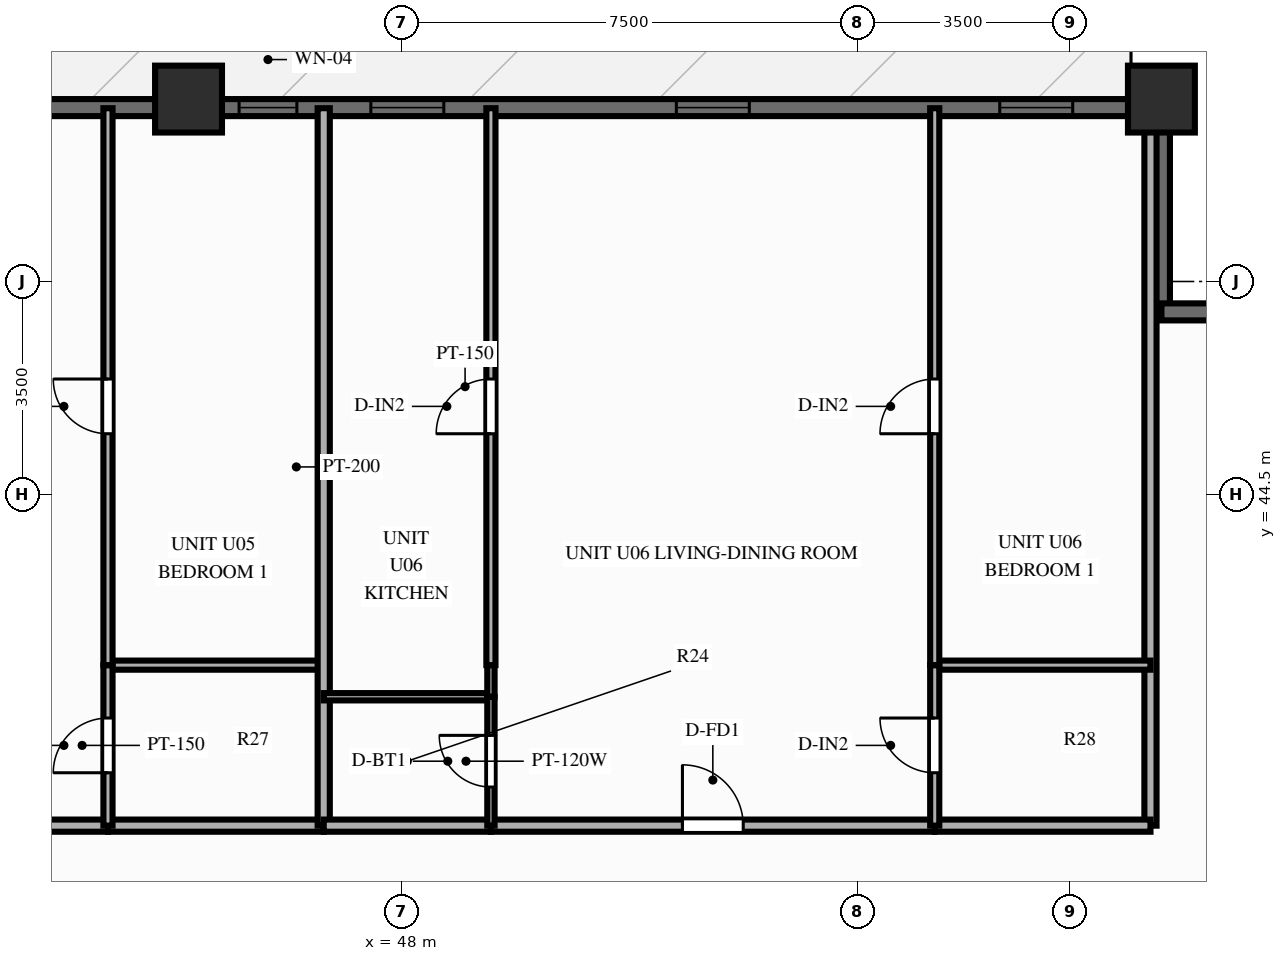
"""IFC4 building model, lengths in metres.
Left out: names, types, materials, properties, quantities, classifications, styles, units other than length and angle.
Written with IfcOpenShell. Run it as: python <this file> out.ifc"""

import sys

from ifc_helpers import new_model, si_unit, direction, frame, frame_2d, origin, origin_2d, place, context, subcontext, project, spatial, rectangle, extrude, source, transform, mapped, element, fill, save


model = new_model("IFC4")
c1 = context("Model", 3, precision=1e-05, world=origin(), true_north=direction((0.0, 1.0)))
c2 = subcontext(c1, "Body", "Model", "MODEL_VIEW")
j1 = project(units=[si_unit("LENGTHUNIT", "METRE"), si_unit("PLANEANGLEUNIT", "RADIAN")], contexts=[c1])
p1 = place(None, origin())
s1 = spatial("IfcSite", under=j1, at=p1, CompositionType="ELEMENT")
p2 = place(p1, origin())
s2 = spatial("IfcBuilding", under=s1, at=p2, CompositionType="ELEMENT")
p3 = place(p2, frame((0.0, 0.0, 46.4)))
s3 = spatial("IfcBuildingStorey", under=s2, at=p3, CompositionType="ELEMENT", Elevation=46.4)
m1 = source(origin(), c2, "Body", "SweptSolid", [
    extrude(rectangle(XDim=1.1, YDim=1.1, at=origin_2d()), origin(), (0.0, 0.0, 1.0), 3.0),
])
for number, where, z_axis, x_axis in (
    (1, (60.5, 51.0, 0.0), (0.0, 0.0, 1.0), (1.0, 0.0, 0.0)),
    (2, (44.5, 51.0, 0.0), (0.0, 0.0, 1.0), (1.0, 0.0, 0.0)),
):
    element("IfcColumn", number, at=place(p3, frame(where, z_axis=z_axis, x_axis=x_axis)), inside=s3, PredefinedType="COLUMN", context=c2, shape_type="MappedRepresentation", body=[
        mapped(m1, transform((0.0, 0.0, 0.0), scale=1.0)),
    ])
p4 = place(p3, frame((15.5, 50.86, 0.0), z_axis=(0.0, 0.0, 1.0), x_axis=(1.0, 0.0, 0.0)))
e3 = element("IfcWall", 3, at=p4, inside=s3, PredefinedType="SOLIDWALL", context=c2, shape_type="SweptSolid", body=[
    extrude(rectangle(XDim=45.0, YDim=0.28, at=frame_2d((22.5, 0.0))), origin(), (0.0, 0.0, 1.0), 2.28),
])
p5 = place(p4, frame((0.76, 0.0, 0.25)))
e4 = element("IfcOpeningElement", 4, at=p5, cuts=e3, PredefinedType="OPENING", context=c2, shape_type="SweptSolid", body=[
    extrude(rectangle(XDim=1.2, YDim=1.5, at=frame_2d((0.6, 0.75))), frame((0.0, 0.152, 0.0), z_axis=(0.0, -1.0, 0.0), x_axis=(1.0, 0.0, 0.0)), (0.0, 0.0, 1.0), 0.304),
])
p6 = place(p4, frame((2.83, 0.0, 0.25)))
e5 = element("IfcOpeningElement", 5, at=p6, cuts=e3, PredefinedType="OPENING", context=c2, shape_type="SweptSolid", body=[
    extrude(rectangle(XDim=1.2, YDim=1.5, at=frame_2d((0.6, 0.75))), frame((0.0, 0.152, 0.0), z_axis=(0.0, -1.0, 0.0), x_axis=(1.0, 0.0, 0.0)), (0.0, 0.0, 1.0), 0.304),
])
p7 = place(p4, frame((5.135, 0.0, 0.25)))
e6 = element("IfcOpeningElement", 6, at=p7, cuts=e3, PredefinedType="OPENING", context=c2, shape_type="SweptSolid", body=[
    extrude(rectangle(XDim=1.2, YDim=1.5, at=frame_2d((0.6, 0.75))), frame((0.0, 0.152, 0.0), z_axis=(0.0, -1.0, 0.0), x_axis=(1.0, 0.0, 0.0)), (0.0, 0.0, 1.0), 0.304),
])
p8 = place(p4, frame((7.753, 0.0, 0.25)))
e7 = element("IfcOpeningElement", 7, at=p8, cuts=e3, PredefinedType="OPENING", context=c2, shape_type="SweptSolid", body=[
    extrude(rectangle(XDim=1.2, YDim=1.5, at=frame_2d((0.6, 0.75))), frame((0.0, 0.152, 0.0), z_axis=(0.0, -1.0, 0.0), x_axis=(1.0, 0.0, 0.0)), (0.0, 0.0, 1.0), 0.304),
])
p9 = place(p4, frame((10.266, 0.0, 0.25)))
e8 = element("IfcOpeningElement", 8, at=p9, cuts=e3, PredefinedType="OPENING", context=c2, shape_type="SweptSolid", body=[
    extrude(rectangle(XDim=1.2, YDim=1.5, at=frame_2d((0.6, 0.75))), frame((0.0, 0.152, 0.0), z_axis=(0.0, -1.0, 0.0), x_axis=(1.0, 0.0, 0.0)), (0.0, 0.0, 1.0), 0.304),
])
p10 = place(p4, frame((12.571, 0.0, 0.25)))
e9 = element("IfcOpeningElement", 9, at=p10, cuts=e3, PredefinedType="OPENING", context=c2, shape_type="SweptSolid", body=[
    extrude(rectangle(XDim=1.2, YDim=1.5, at=frame_2d((0.6, 0.75))), frame((0.0, 0.152, 0.0), z_axis=(0.0, -1.0, 0.0), x_axis=(1.0, 0.0, 0.0)), (0.0, 0.0, 1.0), 0.304),
])
p11 = place(p4, frame((14.643, 0.0, 0.25)))
e10 = element("IfcOpeningElement", 10, at=p11, cuts=e3, PredefinedType="OPENING", context=c2, shape_type="SweptSolid", body=[
    extrude(rectangle(XDim=0.7, YDim=1.5, at=frame_2d((0.35, 0.75))), frame((0.0, 0.152, 0.0), z_axis=(0.0, -1.0, 0.0), x_axis=(1.0, 0.0, 0.0)), (0.0, 0.0, 1.0), 0.304),
])
p12 = place(p4, frame((17.977, 0.0, 0.25)))
e11 = element("IfcOpeningElement", 11, at=p12, cuts=e3, PredefinedType="OPENING", context=c2, shape_type="SweptSolid", body=[
    extrude(rectangle(XDim=1.2, YDim=1.5, at=frame_2d((0.6, 0.75))), frame((0.0, 0.152, 0.0), z_axis=(0.0, -1.0, 0.0), x_axis=(1.0, 0.0, 0.0)), (0.0, 0.0, 1.0), 0.304),
])
p13 = place(p4, frame((23.263, 0.0, 0.0)))
e12 = element("IfcOpeningElement", 12, at=p13, cuts=e3, PredefinedType="OPENING", context=c2, shape_type="SweptSolid", body=[
    extrude(rectangle(XDim=1.1, YDim=2.15, at=frame_2d((0.55, 1.075))), frame((0.0, 0.152, 0.0), z_axis=(0.0, -1.0, 0.0), x_axis=(1.0, 0.0, 0.0)), (0.0, 0.0, 1.0), 0.304),
])
p14 = place(p4, frame((29.832, 0.0, 0.25)))
e13 = element("IfcOpeningElement", 13, at=p14, cuts=e3, PredefinedType="OPENING", context=c2, shape_type="SweptSolid", body=[
    extrude(rectangle(XDim=0.95, YDim=1.5, at=frame_2d((0.475, 0.75))), frame((0.0, 0.152, 0.0), z_axis=(0.0, -1.0, 0.0), x_axis=(1.0, 0.0, 0.0)), (0.0, 0.0, 1.0), 0.304),
])
p15 = place(p4, frame((31.998, 0.0, 0.25)))
e14 = element("IfcOpeningElement", 14, at=p15, cuts=e3, PredefinedType="OPENING", context=c2, shape_type="SweptSolid", body=[
    extrude(rectangle(XDim=1.2, YDim=1.5, at=frame_2d((0.6, 0.75))), frame((0.0, 0.152, 0.0), z_axis=(0.0, -1.0, 0.0), x_axis=(1.0, 0.0, 0.0)), (0.0, 0.0, 1.0), 0.304),
])
p16 = place(p4, frame((37.023, 0.0, 0.25)))
e15 = element("IfcOpeningElement", 15, at=p16, cuts=e3, PredefinedType="OPENING", context=c2, shape_type="SweptSolid", body=[
    extrude(rectangle(XDim=1.2, YDim=1.5, at=frame_2d((0.6, 0.75))), frame((0.0, 0.152, 0.0), z_axis=(0.0, -1.0, 0.0), x_axis=(1.0, 0.0, 0.0)), (0.0, 0.0, 1.0), 0.304),
])
p17 = place(p4, frame((42.341, 0.0, 0.25)))
e16 = element("IfcOpeningElement", 16, at=p17, cuts=e3, PredefinedType="OPENING", context=c2, shape_type="SweptSolid", body=[
    extrude(rectangle(XDim=1.2, YDim=1.5, at=frame_2d((0.6, 0.75))), frame((0.0, 0.152, 0.0), z_axis=(0.0, -1.0, 0.0), x_axis=(1.0, 0.0, 0.0)), (0.0, 0.0, 1.0), 0.304),
])
for number, where, z_axis, x_axis in (
    (17, (60.5, 47.5, 0.0), (0.0, 0.0, 1.0), (0.0, 1.0, 0.0)),
    (18, (60.5, 47.5, 0.0), (0.0, 0.0, 1.0), (1.0, 0.0, 0.0)),
):
    element("IfcWall", number, at=place(p3, frame(where, z_axis=z_axis, x_axis=x_axis)), inside=s3, PredefinedType="SOLIDWALL", context=c2, shape_type="SweptSolid", body=[
        extrude(rectangle(XDim=3.42, YDim=0.28, at=frame_2d((1.71, 0.0))), origin(), (0.0, 0.0, 1.0), 2.28),
    ])
p18 = place(p3, frame((60.32, 39.05, 0.0), z_axis=(0.0, 0.0, 1.0), x_axis=(0.0, 1.0, 0.0)))
e19 = element("IfcWall", 19, at=p18, inside=s3, PredefinedType="PARTITIONING", context=c2, shape_type="SweptSolid", body=[
    extrude(rectangle(XDim=11.8, YDim=0.2, at=frame_2d((5.9, 0.0))), origin(), (0.0, 0.0, 1.0), 2.79),
])
p19 = place(p3, frame((35.451, 39.05, 0.0), z_axis=(0.0, 0.0, 1.0), x_axis=(1.0, 0.0, 0.0)))
e20 = element("IfcWall", 20, at=p19, inside=s3, PredefinedType="PARTITIONING", context=c2, shape_type="SweptSolid", body=[
    extrude(rectangle(XDim=7.724, YDim=0.2, at=frame_2d((3.862, 0.0))), origin(), (0.0, 0.0, 1.0), 2.79),
])
p20 = place(p19, frame((3.362, 0.0, 0.0)))
e21 = element("IfcOpeningElement", 21, at=p20, cuts=e20, PredefinedType="OPENING", context=c2, shape_type="SweptSolid", body=[
    extrude(rectangle(XDim=1.0, YDim=2.15, at=frame_2d((0.5, 1.075))), frame((0.0, 0.112, 0.0), z_axis=(0.0, -1.0, 0.0), x_axis=(1.0, 0.0, 0.0)), (0.0, 0.0, 1.0), 0.224),
])
p21 = place(p3, frame((43.175, 39.05, 0.0), z_axis=(0.0, 0.0, 1.0), x_axis=(1.0, 0.0, 0.0)))
e22 = element("IfcWall", 22, at=p21, inside=s3, PredefinedType="PARTITIONING", context=c2, shape_type="SweptSolid", body=[
    extrude(rectangle(XDim=3.548, YDim=0.2, at=frame_2d((1.774, 0.0))), origin(), (0.0, 0.0, 1.0), 2.79),
])
p22 = place(p3, frame((43.175, 41.69, 0.0), z_axis=(0.0, 0.0, 1.0), x_axis=(1.0, 0.0, 0.0)))
e23 = element("IfcWall", 23, at=p22, inside=s3, PredefinedType="PARTITIONING", context=c2, shape_type="SweptSolid", body=[
    extrude(rectangle(XDim=3.548, YDim=0.15, at=frame_2d((1.774, 0.0))), origin(), (0.0, 0.0, 1.0), 2.79),
])
p23 = place(p3, frame((43.175, 39.05, 0.0), z_axis=(0.0, 0.0, 1.0), x_axis=(0.0, 1.0, 0.0)))
e24 = element("IfcWall", 24, at=p23, inside=s3, PredefinedType="PARTITIONING", context=c2, shape_type="SweptSolid", body=[
    extrude(rectangle(XDim=2.64, YDim=0.15, at=frame_2d((1.32, 0.0))), origin(), (0.0, 0.0, 1.0), 2.79),
])
p24 = place(p23, frame((0.87, 0.0, 0.0)))
e25 = element("IfcOpeningElement", 25, at=p24, cuts=e24, PredefinedType="OPENING", context=c2, shape_type="SweptSolid", body=[
    extrude(rectangle(XDim=0.9, YDim=2.1, at=frame_2d((0.45, 1.05))), frame((0.0, 0.087, 0.0), z_axis=(0.0, -1.0, 0.0), x_axis=(1.0, 0.0, 0.0)), (0.0, 0.0, 1.0), 0.174),
])
p25 = place(p3, frame((43.175, 41.69, 0.0), z_axis=(0.0, 0.0, 1.0), x_axis=(0.0, 1.0, 0.0)))
e26 = element("IfcWall", 26, at=p25, inside=s3, PredefinedType="PARTITIONING", context=c2, shape_type="SweptSolid", body=[
    extrude(rectangle(XDim=9.16, YDim=0.15, at=frame_2d((4.58, 0.0))), origin(), (0.0, 0.0, 1.0), 2.79),
])
p26 = place(p25, frame((3.806, 0.0, 0.0)))
e27 = element("IfcOpeningElement", 27, at=p26, cuts=e26, PredefinedType="OPENING", context=c2, shape_type="SweptSolid", body=[
    extrude(rectangle(XDim=0.9, YDim=2.1, at=frame_2d((0.45, 1.05))), frame((0.0, 0.087, 0.0), z_axis=(0.0, -1.0, 0.0), x_axis=(1.0, 0.0, 0.0)), (0.0, 0.0, 1.0), 0.174),
])
p27 = place(p3, frame((46.723, 39.05, 0.0), z_axis=(0.0, 0.0, 1.0), x_axis=(0.0, 1.0, 0.0)))
e28 = element("IfcWall", 28, at=p27, inside=s3, PredefinedType="PARTITIONING", context=c2, shape_type="SweptSolid", body=[
    extrude(rectangle(XDim=11.8, YDim=0.2, at=frame_2d((5.9, 0.0))), origin(), (0.0, 0.0, 1.0), 2.79),
])
p28 = place(p3, frame((46.723, 39.05, 0.0), z_axis=(0.0, 0.0, 1.0), x_axis=(1.0, 0.0, 0.0)))
e29 = element("IfcWall", 29, at=p28, inside=s3, PredefinedType="PARTITIONING", context=c2, shape_type="SweptSolid", body=[
    extrude(rectangle(XDim=2.75, YDim=0.2, at=frame_2d((1.375, 0.0))), origin(), (0.0, 0.0, 1.0), 2.79),
])
p29 = place(p3, frame((49.473, 39.05, 0.0), z_axis=(0.0, 0.0, 1.0), x_axis=(1.0, 0.0, 0.0)))
e30 = element("IfcWall", 30, at=p29, inside=s3, PredefinedType="PARTITIONING", context=c2, shape_type="SweptSolid", body=[
    extrude(rectangle(XDim=7.299, YDim=0.2, at=frame_2d((3.649, 0.0))), origin(), (0.0, 0.0, 1.0), 2.79),
])
p30 = place(p29, frame((3.149, 0.0, 0.0)))
e31 = element("IfcOpeningElement", 31, at=p30, cuts=e30, PredefinedType="OPENING", context=c2, shape_type="SweptSolid", body=[
    extrude(rectangle(XDim=1.0, YDim=2.15, at=frame_2d((0.5, 1.075))), frame((0.0, 0.112, 0.0), z_axis=(0.0, -1.0, 0.0), x_axis=(1.0, 0.0, 0.0)), (0.0, 0.0, 1.0), 0.224),
])
p31 = place(p3, frame((56.772, 39.05, 0.0), z_axis=(0.0, 0.0, 1.0), x_axis=(1.0, 0.0, 0.0)))
e32 = element("IfcWall", 32, at=p31, inside=s3, PredefinedType="PARTITIONING", context=c2, shape_type="SweptSolid", body=[
    extrude(rectangle(XDim=3.548, YDim=0.2, at=frame_2d((1.774, 0.0))), origin(), (0.0, 0.0, 1.0), 2.79),
])
p32 = place(p3, frame((46.723, 41.17, 0.0), z_axis=(0.0, 0.0, 1.0), x_axis=(1.0, 0.0, 0.0)))
e33 = element("IfcWall", 33, at=p32, inside=s3, PredefinedType="PARTITIONING", context=c2, shape_type="SweptSolid", body=[
    extrude(rectangle(XDim=2.75, YDim=0.12, at=frame_2d((1.375, 0.0))), origin(), (0.0, 0.0, 1.0), 2.79),
])
p33 = place(p3, frame((56.772, 41.69, 0.0), z_axis=(0.0, 0.0, 1.0), x_axis=(1.0, 0.0, 0.0)))
e34 = element("IfcWall", 34, at=p33, inside=s3, PredefinedType="PARTITIONING", context=c2, shape_type="SweptSolid", body=[
    extrude(rectangle(XDim=3.548, YDim=0.15, at=frame_2d((1.774, 0.0))), origin(), (0.0, 0.0, 1.0), 2.79),
])
p34 = place(p3, frame((49.473, 39.05, 0.0), z_axis=(0.0, 0.0, 1.0), x_axis=(0.0, 1.0, 0.0)))
e35 = element("IfcWall", 35, at=p34, inside=s3, PredefinedType="PARTITIONING", context=c2, shape_type="SweptSolid", body=[
    extrude(rectangle(XDim=2.12, YDim=0.12, at=frame_2d((1.06, 0.0))), origin(), (0.0, 0.0, 1.0), 2.79),
])
p35 = place(p34, frame((0.635, 0.0, 0.0)))
e36 = element("IfcOpeningElement", 36, at=p35, cuts=e35, PredefinedType="OPENING", context=c2, shape_type="SweptSolid", body=[
    extrude(rectangle(XDim=0.85, YDim=2.05, at=frame_2d((0.425, 1.025))), frame((0.0, 0.072, 0.0), z_axis=(0.0, -1.0, 0.0), x_axis=(1.0, 0.0, 0.0)), (0.0, 0.0, 1.0), 0.144),
])
p36 = place(p3, frame((49.473, 41.17, 0.0), z_axis=(0.0, 0.0, 1.0), x_axis=(0.0, 1.0, 0.0)))
e37 = element("IfcWall", 37, at=p36, inside=s3, PredefinedType="PARTITIONING", context=c2, shape_type="SweptSolid", body=[
    extrude(rectangle(XDim=0.52, YDim=0.12, at=frame_2d((0.26, 0.0))), origin(), (0.0, 0.0, 1.0), 2.79),
])
p37 = place(p3, frame((49.473, 41.69, 0.0), z_axis=(0.0, 0.0, 1.0), x_axis=(0.0, 1.0, 0.0)))
e38 = element("IfcWall", 38, at=p37, inside=s3, PredefinedType="PARTITIONING", context=c2, shape_type="SweptSolid", body=[
    extrude(rectangle(XDim=9.16, YDim=0.15, at=frame_2d((4.58, 0.0))), origin(), (0.0, 0.0, 1.0), 2.79),
])
p38 = place(p37, frame((3.806, 0.0, 0.0)))
e39 = element("IfcOpeningElement", 39, at=p38, cuts=e38, PredefinedType="OPENING", context=c2, shape_type="SweptSolid", body=[
    extrude(rectangle(XDim=0.9, YDim=2.1, at=frame_2d((0.45, 1.05))), frame((0.0, 0.087, 0.0), z_axis=(0.0, -1.0, 0.0), x_axis=(1.0, 0.0, 0.0)), (0.0, 0.0, 1.0), 0.174),
])
p39 = place(p3, frame((56.772, 39.05, 0.0), z_axis=(0.0, 0.0, 1.0), x_axis=(0.0, 1.0, 0.0)))
e40 = element("IfcWall", 40, at=p39, inside=s3, PredefinedType="PARTITIONING", context=c2, shape_type="SweptSolid", body=[
    extrude(rectangle(XDim=2.64, YDim=0.15, at=frame_2d((1.32, 0.0))), origin(), (0.0, 0.0, 1.0), 2.79),
])
p40 = place(p39, frame((0.87, 0.0, 0.0)))
e41 = element("IfcOpeningElement", 41, at=p40, cuts=e40, PredefinedType="OPENING", context=c2, shape_type="SweptSolid", body=[
    extrude(rectangle(XDim=0.9, YDim=2.1, at=frame_2d((0.45, 1.05))), frame((0.0, 0.087, 0.0), z_axis=(0.0, -1.0, 0.0), x_axis=(1.0, 0.0, 0.0)), (0.0, 0.0, 1.0), 0.174),
])
p41 = place(p3, frame((56.772, 41.69, 0.0), z_axis=(0.0, 0.0, 1.0), x_axis=(0.0, 1.0, 0.0)))
e42 = element("IfcWall", 42, at=p41, inside=s3, PredefinedType="PARTITIONING", context=c2, shape_type="SweptSolid", body=[
    extrude(rectangle(XDim=9.16, YDim=0.15, at=frame_2d((4.58, 0.0))), origin(), (0.0, 0.0, 1.0), 2.79),
])
p42 = place(p41, frame((3.806, 0.0, 0.0)))
e43 = element("IfcOpeningElement", 43, at=p42, cuts=e42, PredefinedType="OPENING", context=c2, shape_type="SweptSolid", body=[
    extrude(rectangle(XDim=0.9, YDim=2.1, at=frame_2d((0.45, 1.05))), frame((0.0, 0.087, 0.0), z_axis=(0.0, -1.0, 0.0), x_axis=(1.0, 0.0, 0.0)), (0.0, 0.0, 1.0), 0.174),
])
m2 = source(origin(), c2, "Body", "SweptSolid", [
    extrude(rectangle(XDim=0.95, YDim=1.5, at=frame_2d((0.475, 0.75))), frame((0.0, 0.03, 0.0), z_axis=(0.0, -1.0, 0.0), x_axis=(1.0, 0.0, 0.0)), (0.0, 0.0, 1.0), 0.06),
])
p43 = place(p14, origin())
e44 = element("IfcWindow", 44, at=p43, inside=s3, PartitioningType="SINGLE_PANEL", PredefinedType="WINDOW", context=c2, shape_type="MappedRepresentation", body=[
    mapped(m2, transform((0.0, 0.0, 0.0), scale=1.0)),
])
fill(e13, e44)
m3 = source(origin(), c2, "Body", "SweptSolid", [
    extrude(rectangle(XDim=1.2, YDim=1.5, at=frame_2d((0.6, 0.75))), frame((0.0, 0.03, 0.0), z_axis=(0.0, -1.0, 0.0), x_axis=(1.0, 0.0, 0.0)), (0.0, 0.0, 1.0), 0.06),
])
p44 = place(p15, origin())
e45 = element("IfcWindow", 45, at=p44, inside=s3, PartitioningType="SINGLE_PANEL", PredefinedType="WINDOW", context=c2, shape_type="MappedRepresentation", body=[
    mapped(m3, transform((0.0, 0.0, 0.0), scale=1.0)),
])
fill(e14, e45)
p45 = place(p16, origin())
e46 = element("IfcWindow", 46, at=p45, inside=s3, PartitioningType="SINGLE_PANEL", PredefinedType="WINDOW", context=c2, shape_type="MappedRepresentation", body=[
    mapped(m3, transform((0.0, 0.0, 0.0), scale=1.0)),
])
fill(e15, e46)
p46 = place(p17, origin())
e47 = element("IfcWindow", 47, at=p46, inside=s3, PartitioningType="SINGLE_PANEL", PredefinedType="WINDOW", context=c2, shape_type="MappedRepresentation", body=[
    mapped(m3, transform((0.0, 0.0, 0.0), scale=1.0)),
])
fill(e16, e47)
m4 = source(origin(), c2, "Body", "SweptSolid", [
    extrude(rectangle(XDim=0.9, YDim=2.1, at=frame_2d((0.45, 1.05))), frame((0.0, 0.025, 0.0), z_axis=(0.0, -1.0, 0.0), x_axis=(1.0, 0.0, 0.0)), (0.0, 0.0, 1.0), 0.05),
])
p47 = place(p24, origin())
e48 = element("IfcDoor", 48, at=p47, inside=s3, OperationType="SINGLE_SWING_LEFT", PredefinedType="DOOR", context=c2, shape_type="MappedRepresentation", body=[
    mapped(m4, transform((0.0, 0.0, 0.0), scale=1.0)),
])
fill(e25, e48)
p48 = place(p26, origin())
e49 = element("IfcDoor", 49, at=p48, inside=s3, OperationType="SINGLE_SWING_RIGHT", PredefinedType="DOOR", context=c2, shape_type="MappedRepresentation", body=[
    mapped(m4, transform((0.0, 0.0, 0.0), scale=1.0)),
])
fill(e27, e49)
m5 = source(origin(), c2, "Body", "SweptSolid", [
    extrude(rectangle(XDim=1.0, YDim=2.15, at=frame_2d((0.5, 1.075))), frame((0.0, 0.025, 0.0), z_axis=(0.0, -1.0, 0.0), x_axis=(1.0, 0.0, 0.0)), (0.0, 0.0, 1.0), 0.05),
])
p49 = place(p30, origin())
e50 = element("IfcDoor", 50, at=p49, inside=s3, OperationType="SINGLE_SWING_LEFT", PredefinedType="DOOR", context=c2, shape_type="MappedRepresentation", body=[
    mapped(m5, transform((0.0, 0.0, 0.0), scale=1.0)),
])
fill(e31, e50)
m6 = source(origin(), c2, "Body", "SweptSolid", [
    extrude(rectangle(XDim=0.85, YDim=2.05, at=frame_2d((0.425, 1.025))), frame((0.0, 0.025, 0.0), z_axis=(0.0, -1.0, 0.0), x_axis=(1.0, 0.0, 0.0)), (0.0, 0.0, 1.0), 0.05),
])
p50 = place(p35, origin())
e51 = element("IfcDoor", 51, at=p50, inside=s3, OperationType="SINGLE_SWING_RIGHT", PredefinedType="DOOR", context=c2, shape_type="MappedRepresentation", body=[
    mapped(m6, transform((0.0, 0.0, 0.0), scale=1.0)),
])
fill(e36, e51)
p51 = place(p38, origin())
e52 = element("IfcDoor", 52, at=p51, inside=s3, OperationType="SINGLE_SWING_LEFT", PredefinedType="DOOR", context=c2, shape_type="MappedRepresentation", body=[
    mapped(m4, transform((0.0, 0.0, 0.0), scale=1.0)),
])
fill(e39, e52)
p52 = place(p40, origin())
e53 = element("IfcDoor", 53, at=p52, inside=s3, OperationType="SINGLE_SWING_RIGHT", PredefinedType="DOOR", context=c2, shape_type="MappedRepresentation", body=[
    mapped(m4, transform((0.0, 0.0, 0.0), scale=1.0)),
])
fill(e41, e53)
p53 = place(p42, origin())
e54 = element("IfcDoor", 54, at=p53, inside=s3, OperationType="SINGLE_SWING_LEFT", PredefinedType="DOOR", context=c2, shape_type="MappedRepresentation", body=[
    mapped(m4, transform((0.0, 0.0, 0.0), scale=1.0)),
])
fill(e43, e54)
save(model, sys.argv[1])
